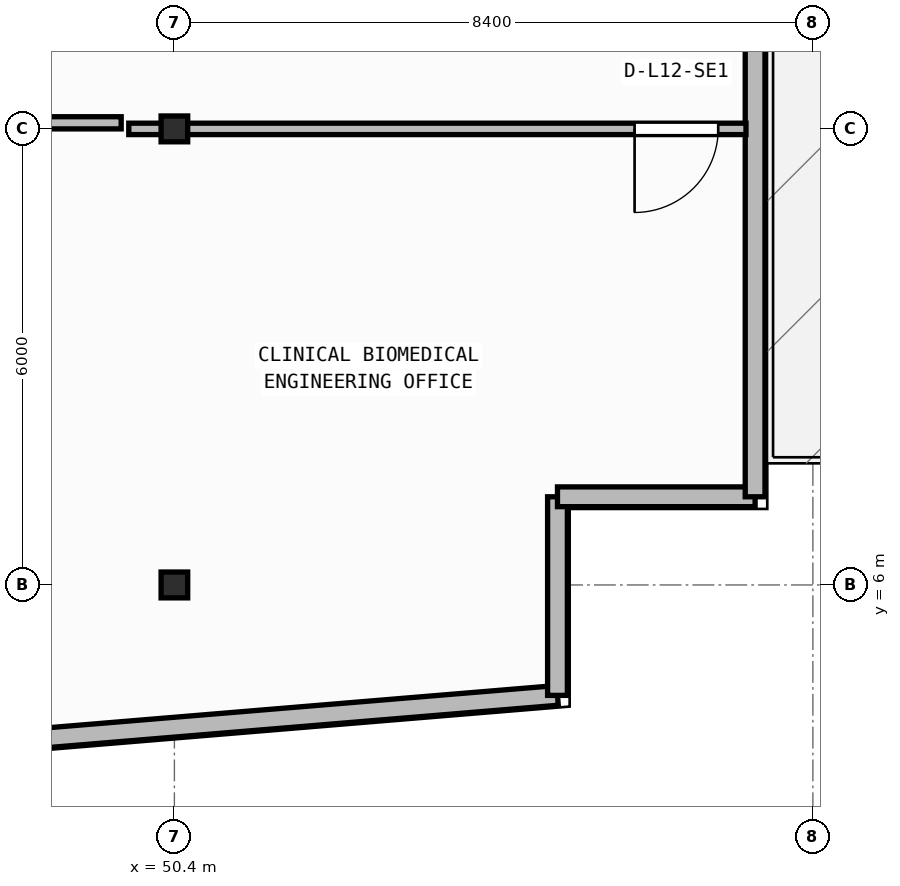
"""IFC4 building model, lengths in metres.
Left out: names, types, materials, properties, quantities, classifications, styles, units other than length and angle.
Written with IfcOpenShell. Run it as: python <this file> out.ifc"""

import sys

from ifc_helpers import new_model, si_unit, direction, frame, frame_2d, origin, origin_2d, place, context, subcontext, project, spatial, rectangle, i_section, extrude, element, fill, save


model = new_model("IFC4")
c1 = context("Model", 3, precision=1e-05, world=origin(), true_north=direction((0.0, 1.0)))
c2 = subcontext(c1, "Body", "Model", "MODEL_VIEW")
j1 = project(units=[si_unit("LENGTHUNIT", "METRE"), si_unit("PLANEANGLEUNIT", "RADIAN")], contexts=[c1])
p1 = place(None, origin())
s1 = spatial("IfcSite", under=j1, at=p1, CompositionType="ELEMENT")
p2 = place(p1, origin())
s2 = spatial("IfcBuilding", under=s1, at=p2, CompositionType="ELEMENT")
p3 = place(p2, frame((0.0, 0.0, 50.15)))
s3 = spatial("IfcBuildingStorey", under=s2, at=p3, CompositionType="ELEMENT", Elevation=50.15)
for number, where, z_axis, x_axis in (
    (1, (50.4, 6.0, 0.0), (0.0, 0.0, 1.0), (1.0, 0.0, 0.0)),
    (2, (50.4, 12.0, 0.0), (0.0, 0.0, 1.0), (1.0, 0.0, 0.0)),
):
    element("IfcColumn", number, at=place(p3, frame(where, z_axis=z_axis, x_axis=x_axis)), inside=s3, PredefinedType="COLUMN", context=c2, shape_type="SweptSolid", body=[
        extrude(i_section(OverallWidth=0.35, OverallDepth=0.34, WebThickness=0.016, FlangeThickness=0.028, at=origin_2d()), origin(), (0.0, 0.0, 1.0), 3.95),
    ])
p4 = place(p3, frame((2.76, 0.174, 0.0), z_axis=(0.0, 0.0, 1.0), x_axis=(0.996571478456, 0.082736257641, 0.0)))
e3 = element("IfcWall", 3, at=p4, inside=s3, PredefinedType="STANDARD", context=c2, shape_type="SweptSolid", body=[
    extrude(rectangle(XDim=52.861, YDim=0.26, at=frame_2d((26.431, 0.0))), origin(), (0.0, 0.0, 1.0), 3.71),
])
p5 = place(p4, frame((25.231, 0.0, 0.9)))
e4 = element("IfcOpeningElement", 4, at=p5, cuts=e3, PredefinedType="OPENING", context=c2, shape_type="SweptSolid", body=[
    extrude(rectangle(XDim=2.4, YDim=1.65, at=frame_2d((1.2, 0.825))), frame((0.0, 0.14, 0.0), z_axis=(0.0, -1.0, 0.0), x_axis=(1.0, 0.0, 0.0)), (0.0, 0.0, 1.0), 0.28),
])
p6 = place(p3, frame((55.44, 4.547, 0.0), z_axis=(0.0, 0.0, 1.0), x_axis=(0.0, 1.0, 0.0)))
e5 = element("IfcWall", 5, at=p6, inside=s3, PredefinedType="STANDARD", context=c2, shape_type="SweptSolid", body=[
    extrude(rectangle(XDim=2.613, YDim=0.26, at=frame_2d((1.306, 0.0))), origin(), (0.0, 0.0, 1.0), 3.71),
])
p7 = place(p3, frame((55.44, 7.16, 0.0), z_axis=(0.0, 0.0, 1.0), x_axis=(1.0, 0.0, 0.0)))
e6 = element("IfcWall", 6, at=p7, inside=s3, PredefinedType="STANDARD", context=c2, shape_type="SweptSolid", body=[
    extrude(rectangle(XDim=2.6, YDim=0.26, at=frame_2d((1.3, 0.0))), origin(), (0.0, 0.0, 1.0), 3.71),
])
p8 = place(p3, frame((58.04, 7.16, 0.0), z_axis=(0.0, 0.0, 1.0), x_axis=(0.0, 1.0, 0.0)))
e7 = element("IfcWall", 7, at=p8, inside=s3, PredefinedType="STANDARD", context=c2, shape_type="SweptSolid", body=[
    extrude(rectangle(XDim=24.48, YDim=0.26, at=frame_2d((12.24, 0.0))), origin(), (0.0, 0.0, 1.0), 3.71),
])
p9 = place(p8, frame((8.87, 0.0, 0.0)))
e8 = element("IfcOpeningElement", 8, at=p9, cuts=e7, PredefinedType="OPENING", context=c2, shape_type="SweptSolid", body=[
    extrude(rectangle(XDim=1.3, YDim=2.15, at=frame_2d((0.65, 1.075))), frame((0.0, 0.14, 0.0), z_axis=(0.0, -1.0, 0.0), x_axis=(1.0, 0.0, 0.0)), (0.0, 0.0, 1.0), 0.28),
])
p10 = place(p3, frame((57.92, 12.0, 0.0), z_axis=(0.0, 0.0, 1.0), x_axis=(-1.0, 0.0, 0.0)))
e9 = element("IfcWall", 9, at=p10, inside=s3, PredefinedType="PARTITIONING", context=c2, shape_type="SweptSolid", body=[
    extrude(rectangle(XDim=8.12, YDim=0.15, at=frame_2d((4.06, 0.0))), origin(), (0.0, 0.0, 1.0), 3.073),
])
p11 = place(p10, frame((0.365, 0.0, 0.0)))
e10 = element("IfcOpeningElement", 10, at=p11, cuts=e9, PredefinedType="OPENING", context=c2, shape_type="SweptSolid", body=[
    extrude(rectangle(XDim=1.1, YDim=2.1, at=frame_2d((0.55, 1.05))), frame((0.0, 0.085, 0.0), z_axis=(0.0, -1.0, 0.0), x_axis=(1.0, 0.0, 0.0)), (0.0, 0.0, 1.0), 0.17),
])
p12 = place(p3, frame((46.689, 12.08, 0.0), z_axis=(0.0, 0.0, 1.0), x_axis=(1.0, 0.0, 0.0)))
e11 = element("IfcWall", 11, at=p12, inside=s3, PredefinedType="PARTITIONING", context=c2, shape_type="SweptSolid", body=[
    extrude(rectangle(XDim=3.011, YDim=0.16, at=frame_2d((1.505, 0.0))), origin(), (0.0, 0.0, 1.0), 3.073),
])
p13 = place(p11, origin())
e12 = element("IfcDoor", 12, at=p13, inside=s3, OperationType="SINGLE_SWING_RIGHT", PredefinedType="DOOR", context=c2, shape_type="SweptSolid", body=[
    extrude(rectangle(XDim=1.1, YDim=2.1, at=frame_2d((0.55, 1.05))), frame((0.0, 0.025, 0.0), z_axis=(0.0, -1.0, 0.0), x_axis=(1.0, 0.0, 0.0)), (0.0, 0.0, 1.0), 0.05),
])
fill(e10, e12)
save(model, sys.argv[1])
